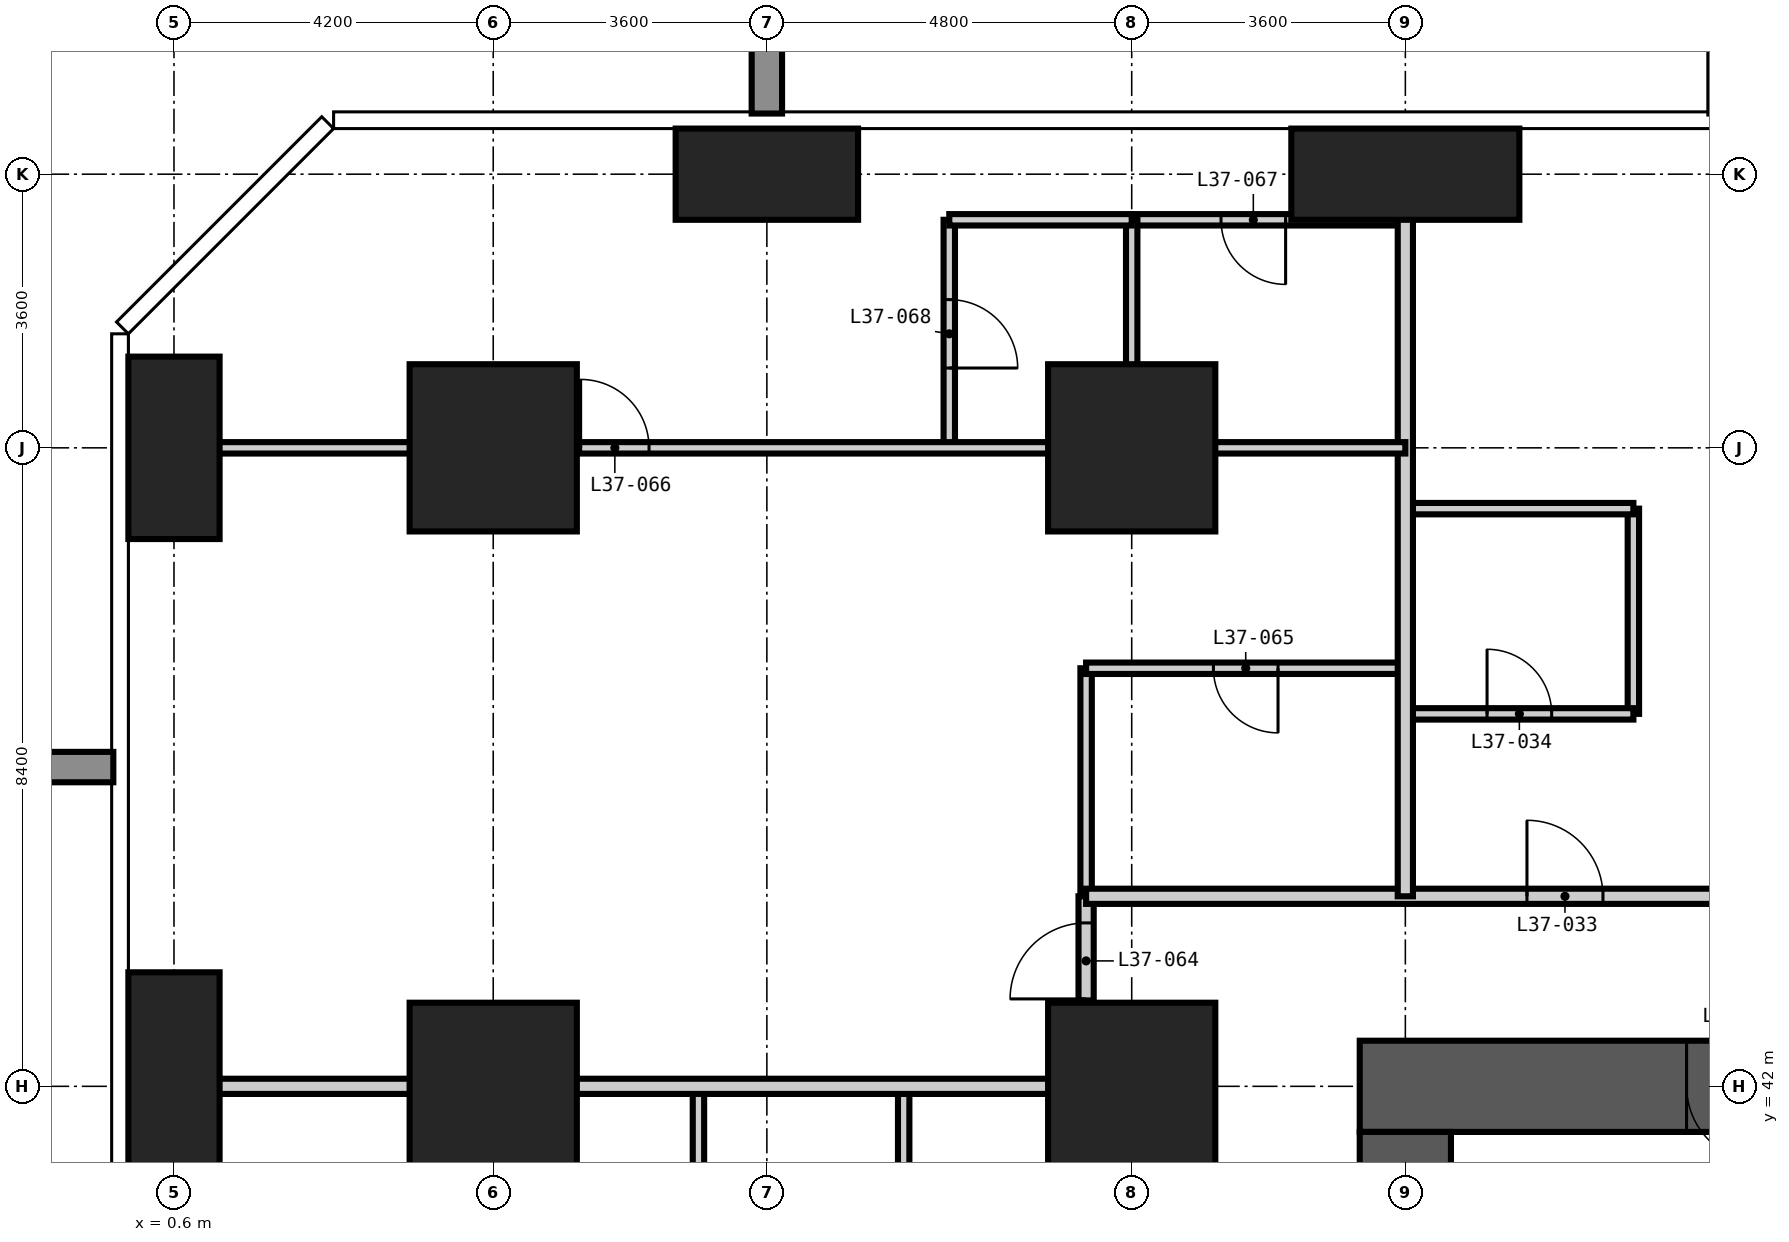
"""IFC4 building model, lengths in metres.
Left out: names, types, materials, properties, quantities, classifications, styles, units other than length and angle.
Written with IfcOpenShell. Run it as: python <this file> out.ifc"""

import sys

from ifc_helpers import new_model, si_unit, direction, frame, frame_2d, origin, origin_2d, place, context, subcontext, project, spatial, rectangle, extrude, element, fill, save


model = new_model("IFC4")
c1 = context("Model", 3, precision=1e-05, world=origin(), true_north=direction((0.0, 1.0)))
c2 = subcontext(c1, "Body", "Model", "MODEL_VIEW")
j1 = project(units=[si_unit("LENGTHUNIT", "METRE"), si_unit("PLANEANGLEUNIT", "RADIAN")], contexts=[c1])
p1 = place(None, origin())
s1 = spatial("IfcSite", under=j1, at=p1, CompositionType="ELEMENT")
p2 = place(p1, origin())
s2 = spatial("IfcBuilding", under=s1, at=p2, CompositionType="ELEMENT")
p3 = place(p2, frame((0.0, 0.0, 144.0)))
s3 = spatial("IfcBuildingStorey", under=s2, at=p3, CompositionType="ELEMENT", Elevation=144.0)
p4 = place(p3, frame((0.6, 42.0, -0.35), z_axis=(0.0, 0.0, 1.0), x_axis=(1.0, 0.0, 0.0)))
e1 = element("IfcColumn", 1, at=p4, inside=s3, PredefinedType="COLUMN", context=c2, shape_type="SweptSolid", body=[
    extrude(rectangle(XDim=1.2, YDim=3.0, at=origin_2d()), origin(), (0.0, 0.0, 1.0), 3.6),
])
p5 = place(p3, frame((0.6, 50.4, -0.35), z_axis=(0.0, 0.0, 1.0), x_axis=(1.0, 0.0, 0.0)))
e2 = element("IfcColumn", 2, at=p5, inside=s3, PredefinedType="COLUMN", context=c2, shape_type="SweptSolid", body=[
    extrude(rectangle(XDim=1.2, YDim=2.4, at=origin_2d()), origin(), (0.0, 0.0, 1.0), 3.6),
])
for number, where, z_axis, x_axis in (
    (3, (4.8, 42.0, -0.35), (0.0, 0.0, 1.0), (1.0, 0.0, 0.0)),
    (4, (4.8, 50.4, -0.35), (0.0, 0.0, 1.0), (1.0, 0.0, 0.0)),
):
    element("IfcColumn", number, at=place(p3, frame(where, z_axis=z_axis, x_axis=x_axis)), inside=s3, PredefinedType="COLUMN", context=c2, shape_type="SweptSolid", body=[
        extrude(rectangle(XDim=2.2, YDim=2.2, at=origin_2d()), origin(), (0.0, 0.0, 1.0), 3.6),
    ])
p6 = place(p3, frame((8.4, 54.0, -0.35), z_axis=(0.0, 0.0, 1.0), x_axis=(1.0, 0.0, 0.0)))
e5 = element("IfcColumn", 5, at=p6, inside=s3, PredefinedType="COLUMN", context=c2, shape_type="SweptSolid", body=[
    extrude(rectangle(XDim=2.4, YDim=1.2, at=origin_2d()), origin(), (0.0, 0.0, 1.0), 3.6),
])
for number, where, z_axis, x_axis in (
    (6, (13.2, 42.0, -0.35), (0.0, 0.0, 1.0), (1.0, 0.0, 0.0)),
    (7, (13.2, 50.4, -0.35), (0.0, 0.0, 1.0), (1.0, 0.0, 0.0)),
):
    element("IfcColumn", number, at=place(p3, frame(where, z_axis=z_axis, x_axis=x_axis)), inside=s3, PredefinedType="COLUMN", context=c2, shape_type="SweptSolid", body=[
        extrude(rectangle(XDim=2.2, YDim=2.2, at=origin_2d()), origin(), (0.0, 0.0, 1.0), 3.6),
    ])
p7 = place(p3, frame((16.8, 54.0, -0.35), z_axis=(0.0, 0.0, 1.0), x_axis=(1.0, 0.0, 0.0)))
e8 = element("IfcColumn", 8, at=p7, inside=s3, PredefinedType="COLUMN", context=c2, shape_type="SweptSolid", body=[
    extrude(rectangle(XDim=3.0, YDim=1.2, at=origin_2d()), origin(), (0.0, 0.0, 1.0), 3.6),
])
p8 = place(p3, frame((42.6, 42.0, -0.35), z_axis=(0.0, 0.0, 1.0), x_axis=(-1.0, 0.0, 0.0)))
e9 = element("IfcWall", 9, at=p8, inside=s3, PredefinedType="SHEAR", context=c2, shape_type="SweptSolid", body=[
    extrude(rectangle(XDim=26.4, YDim=1.2, at=frame_2d((13.2, 0.0))), origin(), (0.0, 0.0, 1.0), 3.6),
])
p9 = place(p8, frame((21.1, 0.0, 0.35)))
e10 = element("IfcOpeningElement", 10, at=p9, cuts=e9, PredefinedType="OPENING", context=c2, shape_type="SweptSolid", body=[
    extrude(rectangle(XDim=1.0, YDim=2.1, at=frame_2d((0.5, 1.05))), frame((0.0, 0.61, 0.0), z_axis=(0.0, -1.0, 0.0), x_axis=(1.0, 0.0, 0.0)), (0.0, 0.0, 1.0), 1.22),
])
p10 = place(p8, frame((10.5, 0.0, 0.35)))
e11 = element("IfcOpeningElement", 11, at=p10, cuts=e9, PredefinedType="OPENING", context=c2, shape_type="SweptSolid", body=[
    extrude(rectangle(XDim=1.2, YDim=2.2, at=frame_2d((0.6, 1.1))), frame((0.0, 0.61, 0.0), z_axis=(0.0, -1.0, 0.0), x_axis=(1.0, 0.0, 0.0)), (0.0, 0.0, 1.0), 1.22),
])
p11 = place(p3, frame((16.8, 41.4, -0.35), z_axis=(0.0, 0.0, 1.0), x_axis=(0.0, -1.0, 0.0)))
e12 = element("IfcWall", 12, at=p11, inside=s3, PredefinedType="SHEAR", context=c2, shape_type="SweptSolid", body=[
    extrude(rectangle(XDim=24.0, YDim=1.2, at=frame_2d((12.0, 0.0))), origin(), (0.0, 0.0, 1.0), 3.6),
])
p12 = place(p11, frame((11.1, 0.0, 0.35)))
e13 = element("IfcOpeningElement", 13, at=p12, cuts=e12, PredefinedType="OPENING", context=c2, shape_type="SweptSolid", body=[
    extrude(rectangle(XDim=1.8, YDim=2.2, at=frame_2d((0.9, 1.1))), frame((0.0, 0.61, 0.0), z_axis=(0.0, -1.0, 0.0), x_axis=(1.0, 0.0, 0.0)), (0.0, 0.0, 1.0), 1.22),
])
p13 = place(p11, frame((19.9, 0.0, 0.35)))
e14 = element("IfcOpeningElement", 14, at=p13, cuts=e12, PredefinedType="OPENING", context=c2, shape_type="SweptSolid", body=[
    extrude(rectangle(XDim=1.0, YDim=2.1, at=frame_2d((0.5, 1.05))), frame((0.0, 0.61, 0.0), z_axis=(0.0, -1.0, 0.0), x_axis=(1.0, 0.0, 0.0)), (0.0, 0.0, 1.0), 1.22),
])
p14 = place(p11, frame((5.2, 0.0, 0.35)))
e15 = element("IfcOpeningElement", 15, at=p14, cuts=e12, PredefinedType="OPENING", context=c2, shape_type="SweptSolid", body=[
    extrude(rectangle(XDim=1.0, YDim=2.1, at=frame_2d((0.5, 1.05))), frame((0.0, 0.61, 0.0), z_axis=(0.0, -1.0, 0.0), x_axis=(1.0, 0.0, 0.0)), (0.0, 0.0, 1.0), 1.22),
])
p15 = place(p3, frame((7.5, 39.0, 0.0), z_axis=(0.0, 0.0, 1.0), x_axis=(0.0, 1.0, 0.0)))
e16 = element("IfcWall", 16, at=p15, inside=s3, PredefinedType="PARTITIONING", context=c2, shape_type="SweptSolid", body=[
    extrude(rectangle(XDim=3.0, YDim=0.15, at=frame_2d((1.5, 0.0))), origin(), (0.0, 0.0, 1.0), 3.25),
])
p16 = place(p15, frame((1.075, 0.0, 0.0)))
e17 = element("IfcOpeningElement", 17, at=p16, cuts=e16, PredefinedType="OPENING", context=c2, shape_type="SweptSolid", body=[
    extrude(rectangle(XDim=0.85, YDim=2.1, at=frame_2d((0.425, 1.05))), frame((0.0, 0.085, 0.0), z_axis=(0.0, -1.0, 0.0), x_axis=(1.0, 0.0, 0.0)), (0.0, 0.0, 1.0), 0.17),
])
for number, where, z_axis, x_axis in (
    (18, (10.2, 39.0, 0.0), (0.0, 0.0, 1.0), (0.0, 1.0, 0.0)),
    (19, (12.6, 44.5, 0.0), (0.0, 0.0, 1.0), (0.0, 1.0, 0.0)),
):
    element("IfcWall", number, at=place(p3, frame(where, z_axis=z_axis, x_axis=x_axis)), inside=s3, PredefinedType="PARTITIONING", context=c2, shape_type="SweptSolid", body=[
        extrude(rectangle(XDim=3.0, YDim=0.15, at=frame_2d((1.5, 0.0))), origin(), (0.0, 0.0, 1.0), 3.25),
    ])
p17 = place(p3, frame((19.8, 46.9, 0.0), z_axis=(0.0, 0.0, 1.0), x_axis=(0.0, 1.0, 0.0)))
e20 = element("IfcWall", 20, at=p17, inside=s3, PredefinedType="PARTITIONING", context=c2, shape_type="SweptSolid", body=[
    extrude(rectangle(XDim=2.7, YDim=0.15, at=frame_2d((1.35, 0.0))), origin(), (0.0, 0.0, 1.0), 3.25),
])
p18 = place(p3, frame((16.8, 46.9, 0.0), z_axis=(0.0, 0.0, 1.0), x_axis=(1.0, 0.0, 0.0)))
e21 = element("IfcWall", 21, at=p18, inside=s3, PredefinedType="PARTITIONING", context=c2, shape_type="SweptSolid", body=[
    extrude(rectangle(XDim=3.0, YDim=0.15, at=frame_2d((1.5, 0.0))), origin(), (0.0, 0.0, 1.0), 3.25),
])
p19 = place(p18, frame((1.075, 0.0, 0.0)))
e22 = element("IfcOpeningElement", 22, at=p19, cuts=e21, PredefinedType="OPENING", context=c2, shape_type="SweptSolid", body=[
    extrude(rectangle(XDim=0.85, YDim=2.1, at=frame_2d((0.425, 1.05))), frame((0.0, 0.085, 0.0), z_axis=(0.0, -1.0, 0.0), x_axis=(1.0, 0.0, 0.0)), (0.0, 0.0, 1.0), 0.17),
])
p20 = place(p3, frame((12.6, 47.5, 0.0), z_axis=(0.0, 0.0, 1.0), x_axis=(1.0, 0.0, 0.0)))
e23 = element("IfcWall", 23, at=p20, inside=s3, PredefinedType="PARTITIONING", context=c2, shape_type="SweptSolid", body=[
    extrude(rectangle(XDim=4.2, YDim=0.15, at=frame_2d((2.1, 0.0))), origin(), (0.0, 0.0, 1.0), 3.25),
])
p21 = place(p20, frame((1.675, 0.0, 0.0)))
e24 = element("IfcOpeningElement", 24, at=p21, cuts=e23, PredefinedType="OPENING", context=c2, shape_type="SweptSolid", body=[
    extrude(rectangle(XDim=0.85, YDim=2.1, at=frame_2d((0.425, 1.05))), frame((0.0, 0.085, 0.0), z_axis=(0.0, -1.0, 0.0), x_axis=(1.0, 0.0, 0.0)), (0.0, 0.0, 1.0), 0.17),
])
p22 = place(p3, frame((16.8, 49.6, 0.0), z_axis=(0.0, 0.0, 1.0), x_axis=(1.0, 0.0, 0.0)))
e25 = element("IfcWall", 25, at=p22, inside=s3, PredefinedType="PARTITIONING", context=c2, shape_type="SweptSolid", body=[
    extrude(rectangle(XDim=3.0, YDim=0.15, at=frame_2d((1.5, 0.0))), origin(), (0.0, 0.0, 1.0), 3.25),
])
p23 = place(p3, frame((13.2, 53.4, 0.0), z_axis=(0.0, 0.0, 1.0), x_axis=(1.0, 0.0, 0.0)))
e26 = element("IfcWall", 26, at=p23, inside=s3, PredefinedType="PARTITIONING", context=c2, shape_type="SweptSolid", body=[
    extrude(rectangle(XDim=3.6, YDim=0.15, at=frame_2d((1.8, 0.0))), origin(), (0.0, 0.0, 1.0), 3.25),
])
p24 = place(p23, frame((1.175, 0.0, 0.0)))
e27 = element("IfcOpeningElement", 27, at=p24, cuts=e26, PredefinedType="OPENING", context=c2, shape_type="SweptSolid", body=[
    extrude(rectangle(XDim=0.85, YDim=2.1, at=frame_2d((0.425, 1.05))), frame((0.0, 0.085, 0.0), z_axis=(0.0, -1.0, 0.0), x_axis=(1.0, 0.0, 0.0)), (0.0, 0.0, 1.0), 0.17),
])
p25 = place(p3, frame((12.6, 13.1, 0.0), z_axis=(0.0, 0.0, 1.0), x_axis=(0.0, 1.0, 0.0)))
e28 = element("IfcWall", 28, at=p25, inside=s3, PredefinedType="PARTITIONING", context=c2, shape_type="SweptSolid", body=[
    extrude(rectangle(XDim=31.4, YDim=0.2, at=frame_2d((15.7, 0.0))), origin(), (0.0, 0.0, 1.0), 3.25),
])
p26 = place(p25, frame((5.3, 0.0, 0.0)))
e29 = element("IfcOpeningElement", 29, at=p26, cuts=e28, PredefinedType="OPENING", context=c2, shape_type="SweptSolid", body=[
    extrude(rectangle(XDim=1.0, YDim=2.2, at=frame_2d((0.5, 1.1))), frame((0.0, 0.11, 0.0), z_axis=(0.0, -1.0, 0.0), x_axis=(1.0, 0.0, 0.0)), (0.0, 0.0, 1.0), 0.22),
])
p27 = place(p25, frame((13.3, 0.0, 0.0)))
e30 = element("IfcOpeningElement", 30, at=p27, cuts=e28, PredefinedType="OPENING", context=c2, shape_type="SweptSolid", body=[
    extrude(rectangle(XDim=1.0, YDim=2.2, at=frame_2d((0.5, 1.1))), frame((0.0, 0.11, 0.0), z_axis=(0.0, -1.0, 0.0), x_axis=(1.0, 0.0, 0.0)), (0.0, 0.0, 1.0), 0.22),
])
p28 = place(p25, frame((18.3, 0.0, 0.0)))
e31 = element("IfcOpeningElement", 31, at=p28, cuts=e28, PredefinedType="OPENING", context=c2, shape_type="SweptSolid", body=[
    extrude(rectangle(XDim=1.0, YDim=2.2, at=frame_2d((0.5, 1.1))), frame((0.0, 0.11, 0.0), z_axis=(0.0, -1.0, 0.0), x_axis=(1.0, 0.0, 0.0)), (0.0, 0.0, 1.0), 0.22),
])
p29 = place(p25, frame((26.3, 0.0, 0.0)))
e32 = element("IfcOpeningElement", 32, at=p29, cuts=e28, PredefinedType="OPENING", context=c2, shape_type="SweptSolid", body=[
    extrude(rectangle(XDim=1.0, YDim=2.2, at=frame_2d((0.5, 1.1))), frame((0.0, 0.11, 0.0), z_axis=(0.0, -1.0, 0.0), x_axis=(1.0, 0.0, 0.0)), (0.0, 0.0, 1.0), 0.22),
])
p30 = place(p25, frame((1.35, 0.0, 0.0)))
e33 = element("IfcOpeningElement", 33, at=p30, cuts=e28, PredefinedType="OPENING", context=c2, shape_type="SweptSolid", body=[
    extrude(rectangle(XDim=1.0, YDim=2.2, at=frame_2d((0.5, 1.1))), frame((0.0, 0.11, 0.0), z_axis=(0.0, -1.0, 0.0), x_axis=(1.0, 0.0, 0.0)), (0.0, 0.0, 1.0), 0.22),
])
p31 = place(p25, frame((30.05, 0.0, 0.0)))
e34 = element("IfcOpeningElement", 34, at=p31, cuts=e28, PredefinedType="OPENING", context=c2, shape_type="SweptSolid", body=[
    extrude(rectangle(XDim=1.0, YDim=2.2, at=frame_2d((0.5, 1.1))), frame((0.0, 0.11, 0.0), z_axis=(0.0, -1.0, 0.0), x_axis=(1.0, 0.0, 0.0)), (0.0, 0.0, 1.0), 0.22),
])
p32 = place(p3, frame((12.6, 44.5, 0.0), z_axis=(0.0, 0.0, 1.0), x_axis=(1.0, 0.0, 0.0)))
e35 = element("IfcWall", 35, at=p32, inside=s3, PredefinedType="PARTITIONING", context=c2, shape_type="SweptSolid", body=[
    extrude(rectangle(XDim=32.5, YDim=0.2, at=frame_2d((16.25, 0.0))), origin(), (0.0, 0.0, 1.0), 3.25),
])
p33 = place(p32, frame((5.8, 0.0, 0.0)))
e36 = element("IfcOpeningElement", 36, at=p33, cuts=e35, PredefinedType="OPENING", context=c2, shape_type="SweptSolid", body=[
    extrude(rectangle(XDim=1.0, YDim=2.2, at=frame_2d((0.5, 1.1))), frame((0.0, 0.11, 0.0), z_axis=(0.0, -1.0, 0.0), x_axis=(1.0, 0.0, 0.0)), (0.0, 0.0, 1.0), 0.22),
])
p34 = place(p32, frame((12.1, 0.0, 0.0)))
e37 = element("IfcOpeningElement", 37, at=p34, cuts=e35, PredefinedType="OPENING", context=c2, shape_type="SweptSolid", body=[
    extrude(rectangle(XDim=1.0, YDim=2.2, at=frame_2d((0.5, 1.1))), frame((0.0, 0.11, 0.0), z_axis=(0.0, -1.0, 0.0), x_axis=(1.0, 0.0, 0.0)), (0.0, 0.0, 1.0), 0.22),
])
p35 = place(p32, frame((20.5, 0.0, 0.0)))
e38 = element("IfcOpeningElement", 38, at=p35, cuts=e35, PredefinedType="OPENING", context=c2, shape_type="SweptSolid", body=[
    extrude(rectangle(XDim=1.0, YDim=2.2, at=frame_2d((0.5, 1.1))), frame((0.0, 0.11, 0.0), z_axis=(0.0, -1.0, 0.0), x_axis=(1.0, 0.0, 0.0)), (0.0, 0.0, 1.0), 0.22),
])
p36 = place(p32, frame((26.8, 0.0, 0.0)))
e39 = element("IfcOpeningElement", 39, at=p36, cuts=e35, PredefinedType="OPENING", context=c2, shape_type="SweptSolid", body=[
    extrude(rectangle(XDim=1.0, YDim=2.2, at=frame_2d((0.5, 1.1))), frame((0.0, 0.11, 0.0), z_axis=(0.0, -1.0, 0.0), x_axis=(1.0, 0.0, 0.0)), (0.0, 0.0, 1.0), 0.22),
])
p37 = place(p3, frame((16.8, 44.5, 0.0), z_axis=(0.0, 0.0, 1.0), x_axis=(0.0, 1.0, 0.0)))
e40 = element("IfcWall", 40, at=p37, inside=s3, PredefinedType="PARTITIONING", context=c2, shape_type="SweptSolid", body=[
    extrude(rectangle(XDim=10.118, YDim=0.2, at=frame_2d((5.059, 0.0))), origin(), (0.0, 0.0, 1.0), 3.25),
])
p38 = place(p3, frame((-0.018, 42.0, 0.0), z_axis=(0.0, 0.0, 1.0), x_axis=(1.0, 0.0, 0.0)))
e41 = element("IfcWall", 41, at=p38, inside=s3, PredefinedType="PARTITIONING", context=c2, shape_type="SweptSolid", body=[
    extrude(rectangle(XDim=12.618, YDim=0.2, at=frame_2d((6.309, 0.0))), origin(), (0.0, 0.0, 1.0), 3.25),
])
p39 = place(p3, frame((10.8, 50.4, 0.0), z_axis=(0.0, 0.0, 1.0), x_axis=(0.0, 1.0, 0.0)))
e42 = element("IfcWall", 42, at=p39, inside=s3, PredefinedType="PARTITIONING", context=c2, shape_type="SweptSolid", body=[
    extrude(rectangle(XDim=3.0, YDim=0.15, at=frame_2d((1.5, 0.0))), origin(), (0.0, 0.0, 1.0), 3.25),
])
p40 = place(p39, frame((1.05, 0.0, 0.0)))
e43 = element("IfcOpeningElement", 43, at=p40, cuts=e42, PredefinedType="OPENING", context=c2, shape_type="SweptSolid", body=[
    extrude(rectangle(XDim=0.9, YDim=2.1, at=frame_2d((0.45, 1.05))), frame((0.0, 0.085, 0.0), z_axis=(0.0, -1.0, 0.0), x_axis=(1.0, 0.0, 0.0)), (0.0, 0.0, 1.0), 0.17),
])
p41 = place(p3, frame((13.2, 50.4, 0.0), z_axis=(0.0, 0.0, 1.0), x_axis=(0.0, 1.0, 0.0)))
e44 = element("IfcWall", 44, at=p41, inside=s3, PredefinedType="PARTITIONING", context=c2, shape_type="SweptSolid", body=[
    extrude(rectangle(XDim=3.0, YDim=0.15, at=frame_2d((1.5, 0.0))), origin(), (0.0, 0.0, 1.0), 3.25),
])
p42 = place(p3, frame((-0.018, 50.4, 0.0), z_axis=(0.0, 0.0, 1.0), x_axis=(1.0, 0.0, 0.0)))
e45 = element("IfcWall", 45, at=p42, inside=s3, PredefinedType="PARTITIONING", context=c2, shape_type="SweptSolid", body=[
    extrude(rectangle(XDim=16.818, YDim=0.15, at=frame_2d((8.409, 0.0))), origin(), (0.0, 0.0, 1.0), 3.25),
])
p43 = place(p42, frame((5.968, 0.0, 0.0)))
e46 = element("IfcOpeningElement", 46, at=p43, cuts=e45, PredefinedType="OPENING", context=c2, shape_type="SweptSolid", body=[
    extrude(rectangle(XDim=0.9, YDim=2.1, at=frame_2d((0.45, 1.05))), frame((0.0, 0.085, 0.0), z_axis=(0.0, -1.0, 0.0), x_axis=(1.0, 0.0, 0.0)), (0.0, 0.0, 1.0), 0.17),
])
p44 = place(p3, frame((10.8, 53.4, 0.0), z_axis=(0.0, 0.0, 1.0), x_axis=(1.0, 0.0, 0.0)))
e47 = element("IfcWall", 47, at=p44, inside=s3, PredefinedType="PARTITIONING", context=c2, shape_type="SweptSolid", body=[
    extrude(rectangle(XDim=2.4, YDim=0.15, at=frame_2d((1.2, 0.0))), origin(), (0.0, 0.0, 1.0), 3.25),
])
p45 = place(p33, origin())
e48 = element("IfcDoor", 48, at=p45, inside=s3, OperationType="SINGLE_SWING_LEFT", PredefinedType="DOOR", context=c2, shape_type="SweptSolid", body=[
    extrude(rectangle(XDim=1.0, YDim=2.2, at=frame_2d((0.5, 1.1))), frame((0.0, 0.025, 0.0), z_axis=(0.0, -1.0, 0.0), x_axis=(1.0, 0.0, 0.0)), (0.0, 0.0, 1.0), 0.05),
])
fill(e36, e48)
p46 = place(p19, origin())
e49 = element("IfcDoor", 49, at=p46, inside=s3, OperationType="SINGLE_SWING_LEFT", PredefinedType="DOOR", context=c2, shape_type="SweptSolid", body=[
    extrude(rectangle(XDim=0.85, YDim=2.1, at=frame_2d((0.425, 1.05))), frame((0.0, 0.025, 0.0), z_axis=(0.0, -1.0, 0.0), x_axis=(1.0, 0.0, 0.0)), (0.0, 0.0, 1.0), 0.05),
])
fill(e22, e49)
p47 = place(p31, origin())
e50 = element("IfcDoor", 50, at=p47, inside=s3, OperationType="SINGLE_SWING_LEFT", PredefinedType="DOOR", context=c2, shape_type="SweptSolid", body=[
    extrude(rectangle(XDim=1.0, YDim=2.2, at=frame_2d((0.5, 1.1))), frame((0.0, 0.025, 0.0), z_axis=(0.0, -1.0, 0.0), x_axis=(1.0, 0.0, 0.0)), (0.0, 0.0, 1.0), 0.05),
])
fill(e34, e50)
p48 = place(p21, frame((0.85, 0.0, 0.0), z_axis=(0.0, 0.0, 1.0), x_axis=(-1.0, 0.0, 0.0)))
e51 = element("IfcDoor", 51, at=p48, inside=s3, OperationType="SINGLE_SWING_LEFT", PredefinedType="DOOR", context=c2, shape_type="SweptSolid", body=[
    extrude(rectangle(XDim=0.85, YDim=2.1, at=frame_2d((0.425, 1.05))), frame((0.0, 0.025, 0.0), z_axis=(0.0, -1.0, 0.0), x_axis=(1.0, 0.0, 0.0)), (0.0, 0.0, 1.0), 0.05),
])
fill(e24, e51)
p49 = place(p43, origin())
e52 = element("IfcDoor", 52, at=p49, inside=s3, OperationType="SINGLE_SWING_LEFT", PredefinedType="DOOR", context=c2, shape_type="SweptSolid", body=[
    extrude(rectangle(XDim=0.9, YDim=2.1, at=frame_2d((0.45, 1.05))), frame((0.0, 0.025, 0.0), z_axis=(0.0, -1.0, 0.0), x_axis=(1.0, 0.0, 0.0)), (0.0, 0.0, 1.0), 0.05),
])
fill(e46, e52)
p50 = place(p24, frame((0.85, 0.0, 0.0), z_axis=(0.0, 0.0, 1.0), x_axis=(-1.0, 0.0, 0.0)))
e53 = element("IfcDoor", 53, at=p50, inside=s3, OperationType="SINGLE_SWING_LEFT", PredefinedType="DOOR", context=c2, shape_type="SweptSolid", body=[
    extrude(rectangle(XDim=0.85, YDim=2.1, at=frame_2d((0.425, 1.05))), frame((0.0, 0.025, 0.0), z_axis=(0.0, -1.0, 0.0), x_axis=(1.0, 0.0, 0.0)), (0.0, 0.0, 1.0), 0.05),
])
fill(e27, e53)
p51 = place(p40, frame((0.9, 0.0, 0.0), z_axis=(0.0, 0.0, 1.0), x_axis=(-1.0, 0.0, 0.0)))
e54 = element("IfcDoor", 54, at=p51, inside=s3, OperationType="SINGLE_SWING_RIGHT", PredefinedType="DOOR", context=c2, shape_type="SweptSolid", body=[
    extrude(rectangle(XDim=0.9, YDim=2.1, at=frame_2d((0.45, 1.05))), frame((0.0, 0.025, 0.0), z_axis=(0.0, -1.0, 0.0), x_axis=(1.0, 0.0, 0.0)), (0.0, 0.0, 1.0), 0.05),
])
fill(e43, e54)
p52 = place(p9, origin())
e55 = element("IfcDoor", 55, at=p52, inside=s3, OperationType="SINGLE_SWING_LEFT", PredefinedType="DOOR", context=c2, shape_type="SweptSolid", body=[
    extrude(rectangle(XDim=1.0, YDim=2.1, at=frame_2d((0.5, 1.05))), frame((0.0, 0.025, 0.0), z_axis=(0.0, -1.0, 0.0), x_axis=(1.0, 0.0, 0.0)), (0.0, 0.0, 1.0), 0.05),
])
fill(e10, e55)
save(model, sys.argv[1])
